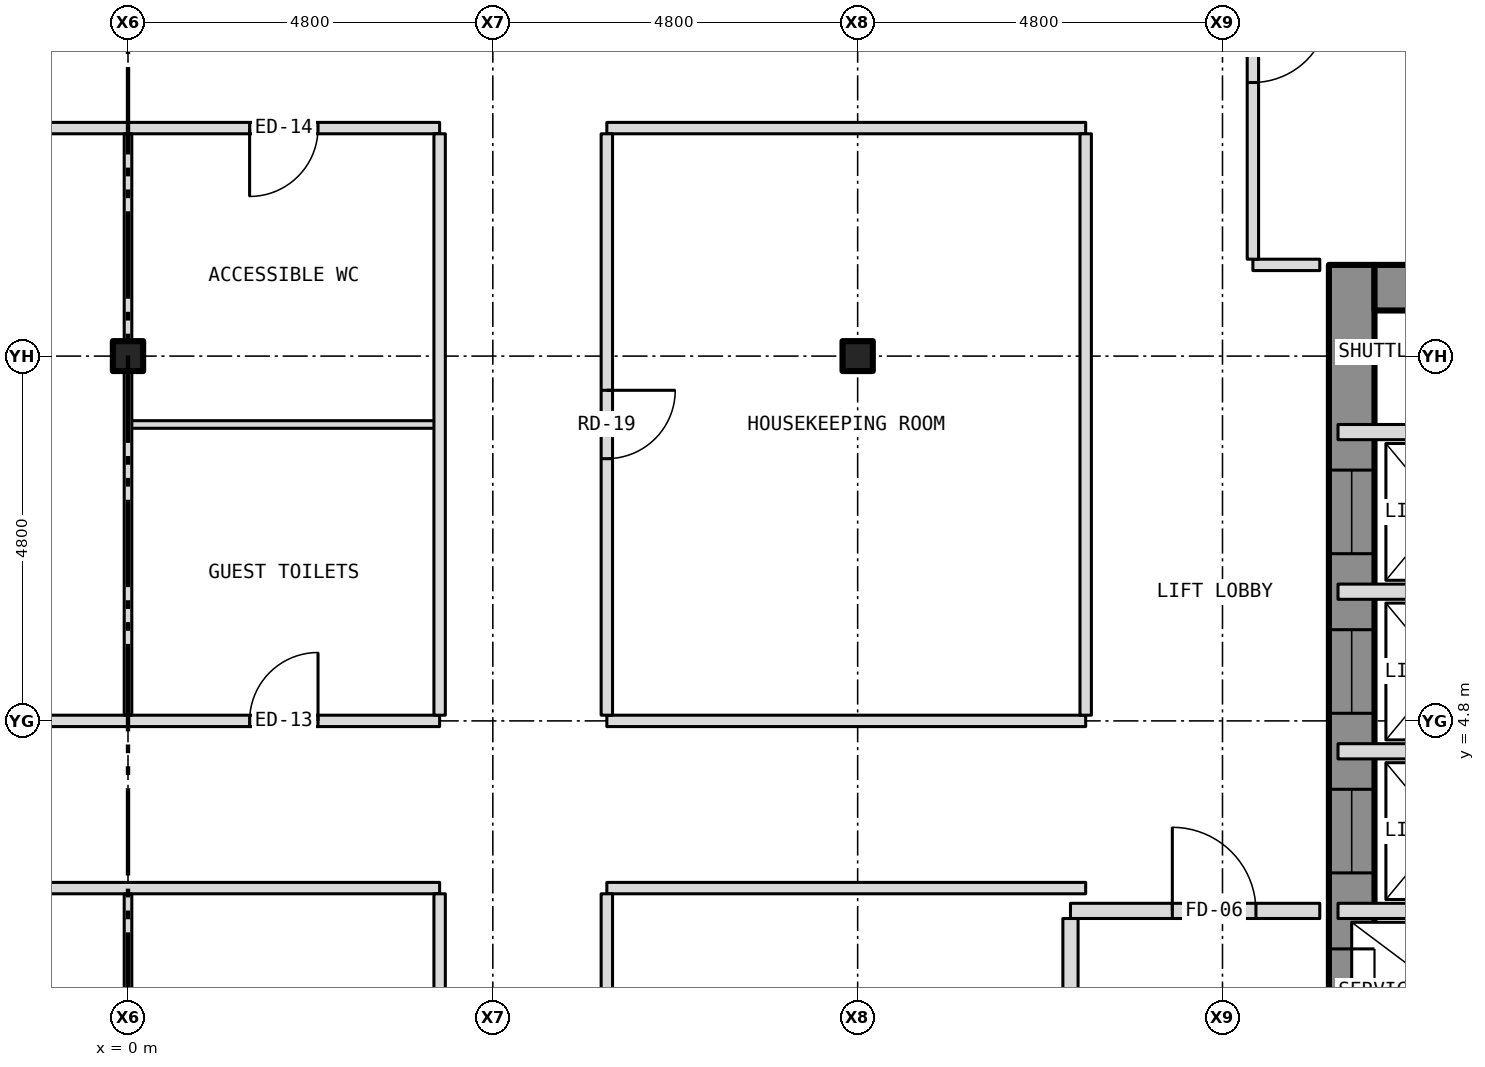
"""IFC4 building model, lengths in metres.
Left out: names, types, materials, properties, quantities, classifications, styles, units other than length and angle.
Written with IfcOpenShell. Run it as: python <this file> out.ifc"""

import sys

from ifc_helpers import new_model, si_unit, direction, frame, frame_2d, origin, origin_2d, place, context, subcontext, project, spatial, rectangle, i_section, extrude, element, fill, save


model = new_model("IFC4")
c1 = context("Model", 3, precision=1e-05, world=origin(), true_north=direction((0.0, 1.0)))
c2 = subcontext(c1, "Body", "Model", "MODEL_VIEW")
j1 = project(units=[si_unit("LENGTHUNIT", "METRE"), si_unit("PLANEANGLEUNIT", "RADIAN")], contexts=[c1])
p1 = place(None, origin())
s1 = spatial("IfcSite", under=j1, at=p1, CompositionType="ELEMENT")
p2 = place(p1, origin())
s2 = spatial("IfcBuilding", under=s1, at=p2, CompositionType="ELEMENT")
p3 = place(p2, frame((0.0, 0.0, 106.5)))
s3 = spatial("IfcBuildingStorey", under=s2, at=p3, CompositionType="ELEMENT", Elevation=106.5)
for number, where, z_axis, x_axis in (
    (1, (0.0, 9.6, -0.15), (0.0, 0.0, 1.0), (1.0, 0.0, 0.0)),
    (2, (9.6, 9.6, -0.15), (0.0, 0.0, 1.0), (1.0, 0.0, 0.0)),
):
    element("IfcColumn", number, at=place(p3, frame(where, z_axis=z_axis, x_axis=x_axis)), inside=s3, PredefinedType="COLUMN", context=c2, shape_type="SweptSolid", body=[
        extrude(i_section(OverallWidth=0.399, OverallDepth=0.394, WebThickness=0.023, FlangeThickness=0.037, at=origin_2d()), origin(), (0.0, 0.0, 1.0), 3.5),
    ])
p4 = place(p3, frame((16.1, -10.8, 0.0), z_axis=(0.0, 0.0, 1.0), x_axis=(0.0, 1.0, 0.0)))
e3 = element("IfcWall", 3, at=p4, inside=s3, PredefinedType="SHEAR", context=c2, shape_type="SweptSolid", body=[
    extrude(rectangle(XDim=21.6, YDim=0.6, at=frame_2d((10.8, 0.0))), origin(), (0.0, 0.0, 1.0), 3.25),
])
p5 = place(p4, frame((9.4, 0.0, 0.0)))
e4 = element("IfcOpeningElement", 4, at=p5, cuts=e3, PredefinedType="OPENING", context=c2, shape_type="SweptSolid", body=[
    extrude(rectangle(XDim=1.1, YDim=2.1, at=frame_2d((0.55, 1.05))), frame((0.0, 0.312, 0.0), z_axis=(0.0, -1.0, 0.0), x_axis=(1.0, 0.0, 0.0)), (0.0, 0.0, 1.0), 0.624),
])
p6 = place(p4, frame((11.5, 0.0, 0.0)))
e5 = element("IfcOpeningElement", 5, at=p6, cuts=e3, PredefinedType="OPENING", context=c2, shape_type="SweptSolid", body=[
    extrude(rectangle(XDim=1.1, YDim=2.1, at=frame_2d((0.55, 1.05))), frame((0.0, 0.312, 0.0), z_axis=(0.0, -1.0, 0.0), x_axis=(1.0, 0.0, 0.0)), (0.0, 0.0, 1.0), 0.624),
])
p7 = place(p4, frame((13.6, 0.0, 0.0)))
e6 = element("IfcOpeningElement", 6, at=p7, cuts=e3, PredefinedType="OPENING", context=c2, shape_type="SweptSolid", body=[
    extrude(rectangle(XDim=1.1, YDim=2.1, at=frame_2d((0.55, 1.05))), frame((0.0, 0.312, 0.0), z_axis=(0.0, -1.0, 0.0), x_axis=(1.0, 0.0, 0.0)), (0.0, 0.0, 1.0), 0.624),
])
p8 = place(p4, frame((15.7, 0.0, 0.0)))
e7 = element("IfcOpeningElement", 7, at=p8, cuts=e3, PredefinedType="OPENING", context=c2, shape_type="SweptSolid", body=[
    extrude(rectangle(XDim=1.1, YDim=2.1, at=frame_2d((0.55, 1.05))), frame((0.0, 0.312, 0.0), z_axis=(0.0, -1.0, 0.0), x_axis=(1.0, 0.0, 0.0)), (0.0, 0.0, 1.0), 0.624),
])
p9 = place(p4, frame((17.8, 0.0, 0.0)))
e8 = element("IfcOpeningElement", 8, at=p9, cuts=e3, PredefinedType="OPENING", context=c2, shape_type="SweptSolid", body=[
    extrude(rectangle(XDim=1.1, YDim=2.1, at=frame_2d((0.55, 1.05))), frame((0.0, 0.312, 0.0), z_axis=(0.0, -1.0, 0.0), x_axis=(1.0, 0.0, 0.0)), (0.0, 0.0, 1.0), 0.624),
])
p10 = place(p4, frame((5.642, 0.0, 0.0)))
e9 = element("IfcOpeningElement", 9, at=p10, cuts=e3, PredefinedType="OPENING", context=c2, shape_type="SweptSolid", body=[
    extrude(rectangle(XDim=1.1, YDim=2.1, at=frame_2d((0.55, 1.05))), frame((0.0, 0.312, 0.0), z_axis=(0.0, -1.0, 0.0), x_axis=(1.0, 0.0, 0.0)), (0.0, 0.0, 1.0), 0.624),
])
p11 = place(p4, frame((7.5, 0.0, 0.0)))
e10 = element("IfcOpeningElement", 10, at=p11, cuts=e3, PredefinedType="OPENING", context=c2, shape_type="SweptSolid", body=[
    extrude(rectangle(XDim=1.1, YDim=2.1, at=frame_2d((0.55, 1.05))), frame((0.0, 0.312, 0.0), z_axis=(0.0, -1.0, 0.0), x_axis=(1.0, 0.0, 0.0)), (0.0, 0.0, 1.0), 0.624),
])
p12 = place(p3, frame((16.4, 10.5, 0.0), z_axis=(0.0, 0.0, 1.0), x_axis=(1.0, 0.0, 0.0)))
e11 = element("IfcWall", 11, at=p12, inside=s3, PredefinedType="SHEAR", context=c2, shape_type="SweptSolid", body=[
    extrude(rectangle(XDim=5.8, YDim=0.6, at=frame_2d((2.9, 0.0))), origin(), (0.0, 0.0, 1.0), 3.25),
])
p13 = place(p3, frame((12.4, 2.3, 0.0), z_axis=(0.0, 0.0, 1.0), x_axis=(1.0, 0.0, 0.0)))
e12 = element("IfcWall", 12, at=p13, inside=s3, PredefinedType="PARTITIONING", context=c2, shape_type="SweptSolid", body=[
    extrude(rectangle(XDim=3.28, YDim=0.2, at=frame_2d((1.64, 0.0))), origin(), (0.0, 0.0, 1.0), 3.35),
])
p14 = place(p13, frame((1.34, 0.0, 0.0)))
e13 = element("IfcOpeningElement", 13, at=p14, cuts=e12, PredefinedType="OPENING", context=c2, shape_type="SweptSolid", body=[
    extrude(rectangle(XDim=1.1, YDim=2.1, at=frame_2d((0.55, 1.05))), frame((0.0, 0.112, 0.0), z_axis=(0.0, -1.0, 0.0), x_axis=(1.0, 0.0, 0.0)), (0.0, 0.0, 1.0), 0.224),
])
p15 = place(p3, frame((15.92, 2.3, 0.0), z_axis=(0.0, 0.0, 1.0), x_axis=(1.0, 0.0, 0.0)))
e14 = element("IfcWall", 14, at=p15, inside=s3, PredefinedType="PARTITIONING", context=c2, shape_type="SweptSolid", body=[
    extrude(rectangle(XDim=2.88, YDim=0.2, at=frame_2d((1.44, 0.0))), origin(), (0.0, 0.0, 1.0), 3.25),
])
p16 = place(p3, frame((-12.6, 2.6, 0.0), z_axis=(0.0, 0.0, 1.0), x_axis=(1.0, 0.0, 0.0)))
e15 = element("IfcWall", 15, at=p16, inside=s3, PredefinedType="PARTITIONING", context=c2, shape_type="SweptSolid", body=[
    extrude(rectangle(XDim=16.7, YDim=0.15, at=frame_2d((8.35, 0.0))), origin(), (0.0, 0.0, 1.0), 3.35),
])
p17 = place(p16, frame((5.85, 0.0, 0.0)))
e16 = element("IfcOpeningElement", 16, at=p17, cuts=e15, PredefinedType="OPENING", context=c2, shape_type="SweptSolid", body=[
    extrude(rectangle(XDim=0.9, YDim=2.1, at=frame_2d((0.45, 1.05))), frame((0.0, 0.087, 0.0), z_axis=(0.0, -1.0, 0.0), x_axis=(1.0, 0.0, 0.0)), (0.0, 0.0, 1.0), 0.174),
])
p18 = place(p3, frame((6.3, 2.6, 0.0), z_axis=(0.0, 0.0, 1.0), x_axis=(1.0, 0.0, 0.0)))
e17 = element("IfcWall", 17, at=p18, inside=s3, PredefinedType="PARTITIONING", context=c2, shape_type="SweptSolid", body=[
    extrude(rectangle(XDim=6.3, YDim=0.15, at=frame_2d((3.15, 0.0))), origin(), (0.0, 0.0, 1.0), 3.35),
])
p19 = place(p3, frame((15.92, 4.4, 0.0), z_axis=(0.0, 0.0, 1.0), x_axis=(1.0, 0.0, 0.0)))
e18 = element("IfcWall", 18, at=p19, inside=s3, PredefinedType="PARTITIONING", context=c2, shape_type="SweptSolid", body=[
    extrude(rectangle(XDim=2.88, YDim=0.2, at=frame_2d((1.44, 0.0))), origin(), (0.0, 0.0, 1.0), 3.25),
])
p20 = place(p3, frame((-12.6, 4.8, 0.0), z_axis=(0.0, 0.0, 1.0), x_axis=(1.0, 0.0, 0.0)))
e19 = element("IfcWall", 19, at=p20, inside=s3, PredefinedType="PARTITIONING", context=c2, shape_type="SweptSolid", body=[
    extrude(rectangle(XDim=16.7, YDim=0.15, at=frame_2d((8.35, 0.0))), origin(), (0.0, 0.0, 1.0), 3.35),
])
p21 = place(p20, frame((14.2, 0.0, 0.0)))
e20 = element("IfcOpeningElement", 20, at=p21, cuts=e19, PredefinedType="OPENING", context=c2, shape_type="SweptSolid", body=[
    extrude(rectangle(XDim=0.9, YDim=2.1, at=frame_2d((0.45, 1.05))), frame((0.0, 0.087, 0.0), z_axis=(0.0, -1.0, 0.0), x_axis=(1.0, 0.0, 0.0)), (0.0, 0.0, 1.0), 0.174),
])
p22 = place(p3, frame((6.3, 4.8, 0.0), z_axis=(0.0, 0.0, 1.0), x_axis=(1.0, 0.0, 0.0)))
e21 = element("IfcWall", 21, at=p22, inside=s3, PredefinedType="PARTITIONING", context=c2, shape_type="SweptSolid", body=[
    extrude(rectangle(XDim=6.3, YDim=0.15, at=frame_2d((3.15, 0.0))), origin(), (0.0, 0.0, 1.0), 3.35),
])
for number, where, z_axis, x_axis in (
    (22, (15.92, 6.5, 0.0), (0.0, 0.0, 1.0), (1.0, 0.0, 0.0)),
    (23, (15.92, 8.6, 0.0), (0.0, 0.0, 1.0), (1.0, 0.0, 0.0)),
):
    element("IfcWall", number, at=place(p3, frame(where, z_axis=z_axis, x_axis=x_axis)), inside=s3, PredefinedType="PARTITIONING", context=c2, shape_type="SweptSolid", body=[
        extrude(rectangle(XDim=2.88, YDim=0.2, at=frame_2d((1.44, 0.0))), origin(), (0.0, 0.0, 1.0), 3.25),
    ])
p23 = place(p3, frame((0.0, 8.7, 0.0), z_axis=(0.0, 0.0, 1.0), x_axis=(1.0, 0.0, 0.0)))
e24 = element("IfcWall", 24, at=p23, inside=s3, PredefinedType="PARTITIONING", context=c2, shape_type="SweptSolid", body=[
    extrude(rectangle(XDim=4.1, YDim=0.1, at=frame_2d((2.05, 0.0))), origin(), (0.0, 0.0, 1.0), 3.35),
])
p24 = place(p3, frame((14.8, 10.8, 0.0), z_axis=(0.0, 0.0, 1.0), x_axis=(1.0, 0.0, 0.0)))
e25 = element("IfcWall", 25, at=p24, inside=s3, PredefinedType="PARTITIONING", context=c2, shape_type="SweptSolid", body=[
    extrude(rectangle(XDim=0.88, YDim=0.15, at=frame_2d((0.44, 0.0))), origin(), (0.0, 0.0, 1.0), 3.35),
])
p25 = place(p3, frame((-12.6, 12.6, 0.0), z_axis=(0.0, 0.0, 1.0), x_axis=(1.0, 0.0, 0.0)))
e26 = element("IfcWall", 26, at=p25, inside=s3, PredefinedType="PARTITIONING", context=c2, shape_type="SweptSolid", body=[
    extrude(rectangle(XDim=16.7, YDim=0.15, at=frame_2d((8.35, 0.0))), origin(), (0.0, 0.0, 1.0), 3.35),
])
p26 = place(p25, frame((14.2, 0.0, 0.0)))
e27 = element("IfcOpeningElement", 27, at=p26, cuts=e26, PredefinedType="OPENING", context=c2, shape_type="SweptSolid", body=[
    extrude(rectangle(XDim=0.9, YDim=2.1, at=frame_2d((0.45, 1.05))), frame((0.0, 0.087, 0.0), z_axis=(0.0, -1.0, 0.0), x_axis=(1.0, 0.0, 0.0)), (0.0, 0.0, 1.0), 0.174),
])
p27 = place(p25, frame((5.85, 0.0, 0.0)))
e28 = element("IfcOpeningElement", 28, at=p27, cuts=e26, PredefinedType="OPENING", context=c2, shape_type="SweptSolid", body=[
    extrude(rectangle(XDim=0.9, YDim=2.1, at=frame_2d((0.45, 1.05))), frame((0.0, 0.087, 0.0), z_axis=(0.0, -1.0, 0.0), x_axis=(1.0, 0.0, 0.0)), (0.0, 0.0, 1.0), 0.174),
])
p28 = place(p3, frame((6.3, 12.6, 0.0), z_axis=(0.0, 0.0, 1.0), x_axis=(1.0, 0.0, 0.0)))
e29 = element("IfcWall", 29, at=p28, inside=s3, PredefinedType="PARTITIONING", context=c2, shape_type="SweptSolid", body=[
    extrude(rectangle(XDim=6.3, YDim=0.15, at=frame_2d((3.15, 0.0))), origin(), (0.0, 0.0, 1.0), 3.35),
])
p29 = place(p3, frame((0.0, 0.199, 0.0), z_axis=(0.0, 0.0, 1.0), x_axis=(0.0, 1.0, 0.0)))
e30 = element("IfcWall", 30, at=p29, inside=s3, PredefinedType="PARTITIONING", context=c2, shape_type="SweptSolid", body=[
    extrude(rectangle(XDim=2.326, YDim=0.1, at=frame_2d((1.163, 0.0))), origin(), (0.0, 0.0, 1.0), 2.728),
])
p30 = place(p3, frame((0.0, 4.875, 0.0), z_axis=(0.0, 0.0, 1.0), x_axis=(0.0, 1.0, 0.0)))
e31 = element("IfcWall", 31, at=p30, inside=s3, PredefinedType="PARTITIONING", context=c2, shape_type="SweptSolid", body=[
    extrude(rectangle(XDim=4.526, YDim=0.1, at=frame_2d((2.263, 0.0))), origin(), (0.0, 0.0, 1.0), 2.728),
])
p31 = place(p3, frame((0.0, 9.401, 0.0), z_axis=(0.0, 0.0, 1.0), x_axis=(0.0, 1.0, 0.0)))
e32 = element("IfcWall", 32, at=p31, inside=s3, PredefinedType="PARTITIONING", context=c2, shape_type="SweptSolid", body=[
    extrude(rectangle(XDim=0.398, YDim=0.1, at=frame_2d((0.199, 0.0))), origin(), (0.0, 0.0, 1.0), 3.35),
])
p32 = place(p3, frame((0.0, 9.799, 0.0), z_axis=(0.0, 0.0, 1.0), x_axis=(0.0, 1.0, 0.0)))
e33 = element("IfcWall", 33, at=p32, inside=s3, PredefinedType="PARTITIONING", context=c2, shape_type="SweptSolid", body=[
    extrude(rectangle(XDim=2.726, YDim=0.1, at=frame_2d((1.363, 0.0))), origin(), (0.0, 0.0, 1.0), 2.728),
])
p33 = place(p3, frame((4.1, -12.525, 0.0), z_axis=(0.0, 0.0, 1.0), x_axis=(0.0, 1.0, 0.0)))
e34 = element("IfcWall", 34, at=p33, inside=s3, PredefinedType="PARTITIONING", context=c2, shape_type="SweptSolid", body=[
    extrude(rectangle(XDim=15.05, YDim=0.15, at=frame_2d((7.525, 0.0))), origin(), (0.0, 0.0, 1.0), 3.35),
])
p34 = place(p33, frame((7.075, 0.0, 0.0)))
e35 = element("IfcOpeningElement", 35, at=p34, cuts=e34, PredefinedType="OPENING", context=c2, shape_type="SweptSolid", body=[
    extrude(rectangle(XDim=0.9, YDim=2.1, at=frame_2d((0.45, 1.05))), frame((0.0, 0.087, 0.0), z_axis=(0.0, -1.0, 0.0), x_axis=(1.0, 0.0, 0.0)), (0.0, 0.0, 1.0), 0.174),
])
p35 = place(p3, frame((4.1, 4.875, 0.0), z_axis=(0.0, 0.0, 1.0), x_axis=(0.0, 1.0, 0.0)))
e36 = element("IfcWall", 36, at=p35, inside=s3, PredefinedType="PARTITIONING", context=c2, shape_type="SweptSolid", body=[
    extrude(rectangle(XDim=7.65, YDim=0.15, at=frame_2d((3.825, 0.0))), origin(), (0.0, 0.0, 1.0), 3.35),
])
p36 = place(p3, frame((6.3, -12.525, 0.0), z_axis=(0.0, 0.0, 1.0), x_axis=(0.0, 1.0, 0.0)))
e37 = element("IfcWall", 37, at=p36, inside=s3, PredefinedType="PARTITIONING", context=c2, shape_type="SweptSolid", body=[
    extrude(rectangle(XDim=15.05, YDim=0.15, at=frame_2d((7.525, 0.0))), origin(), (0.0, 0.0, 1.0), 3.35),
])
p37 = place(p36, frame((7.075, 0.0, 0.0)))
e38 = element("IfcOpeningElement", 38, at=p37, cuts=e37, PredefinedType="OPENING", context=c2, shape_type="SweptSolid", body=[
    extrude(rectangle(XDim=0.9, YDim=2.1, at=frame_2d((0.45, 1.05))), frame((0.0, 0.087, 0.0), z_axis=(0.0, -1.0, 0.0), x_axis=(1.0, 0.0, 0.0)), (0.0, 0.0, 1.0), 0.174),
])
p38 = place(p3, frame((6.3, 4.875, 0.0), z_axis=(0.0, 0.0, 1.0), x_axis=(0.0, 1.0, 0.0)))
e39 = element("IfcWall", 39, at=p38, inside=s3, PredefinedType="PARTITIONING", context=c2, shape_type="SweptSolid", body=[
    extrude(rectangle(XDim=7.65, YDim=0.15, at=frame_2d((3.825, 0.0))), origin(), (0.0, 0.0, 1.0), 3.35),
])
p39 = place(p38, frame((3.375, 0.0, 0.0)))
e40 = element("IfcOpeningElement", 40, at=p39, cuts=e39, PredefinedType="OPENING", context=c2, shape_type="SweptSolid", body=[
    extrude(rectangle(XDim=0.9, YDim=2.1, at=frame_2d((0.45, 1.05))), frame((0.0, 0.087, 0.0), z_axis=(0.0, -1.0, 0.0), x_axis=(1.0, 0.0, 0.0)), (0.0, 0.0, 1.0), 0.174),
])
p40 = place(p3, frame((12.4, -1.8, 0.0), z_axis=(0.0, 0.0, 1.0), x_axis=(0.0, 1.0, 0.0)))
e41 = element("IfcWall", 41, at=p40, inside=s3, PredefinedType="PARTITIONING", context=c2, shape_type="SweptSolid", body=[
    extrude(rectangle(XDim=4.0, YDim=0.2, at=frame_2d((2.0, 0.0))), origin(), (0.0, 0.0, 1.0), 3.35),
])
p41 = place(p3, frame((12.6, 4.875, 0.0), z_axis=(0.0, 0.0, 1.0), x_axis=(0.0, 1.0, 0.0)))
e42 = element("IfcWall", 42, at=p41, inside=s3, PredefinedType="PARTITIONING", context=c2, shape_type="SweptSolid", body=[
    extrude(rectangle(XDim=7.65, YDim=0.15, at=frame_2d((3.825, 0.0))), origin(), (0.0, 0.0, 1.0), 3.35),
])
p42 = place(p3, frame((14.8, 10.875, 0.0), z_axis=(0.0, 0.0, 1.0), x_axis=(0.0, 1.0, 0.0)))
e43 = element("IfcWall", 43, at=p42, inside=s3, PredefinedType="PARTITIONING", context=c2, shape_type="SweptSolid", body=[
    extrude(rectangle(XDim=3.85, YDim=0.15, at=frame_2d((1.925, 0.0))), origin(), (0.0, 0.0, 1.0), 3.35),
])
p43 = place(p42, frame((2.325, 0.0, 0.0)))
e44 = element("IfcOpeningElement", 44, at=p43, cuts=e43, PredefinedType="OPENING", context=c2, shape_type="SweptSolid", body=[
    extrude(rectangle(XDim=1.0, YDim=2.1, at=frame_2d((0.5, 1.05))), frame((0.0, 0.087, 0.0), z_axis=(0.0, -1.0, 0.0), x_axis=(1.0, 0.0, 0.0)), (0.0, 0.0, 1.0), 0.174),
])
p44 = place(p6, origin())
e45 = element("IfcDoor", 45, at=p44, inside=s3, OperationType="SLIDING_TO_LEFT", PredefinedType="DOOR", context=c2, shape_type="SweptSolid", body=[
    extrude(rectangle(XDim=1.1, YDim=2.1, at=frame_2d((0.55, 1.05))), frame((0.0, 0.025, 0.0), z_axis=(0.0, -1.0, 0.0), x_axis=(1.0, 0.0, 0.0)), (0.0, 0.0, 1.0), 0.05),
])
fill(e5, e45)
p45 = place(p7, origin())
e46 = element("IfcDoor", 46, at=p45, inside=s3, OperationType="SLIDING_TO_LEFT", PredefinedType="DOOR", context=c2, shape_type="SweptSolid", body=[
    extrude(rectangle(XDim=1.1, YDim=2.1, at=frame_2d((0.55, 1.05))), frame((0.0, 0.025, 0.0), z_axis=(0.0, -1.0, 0.0), x_axis=(1.0, 0.0, 0.0)), (0.0, 0.0, 1.0), 0.05),
])
fill(e6, e46)
p46 = place(p8, origin())
e47 = element("IfcDoor", 47, at=p46, inside=s3, OperationType="SLIDING_TO_LEFT", PredefinedType="DOOR", context=c2, shape_type="SweptSolid", body=[
    extrude(rectangle(XDim=1.1, YDim=2.1, at=frame_2d((0.55, 1.05))), frame((0.0, 0.025, 0.0), z_axis=(0.0, -1.0, 0.0), x_axis=(1.0, 0.0, 0.0)), (0.0, 0.0, 1.0), 0.05),
])
fill(e7, e47)
p47 = place(p9, origin())
e48 = element("IfcDoor", 48, at=p47, inside=s3, OperationType="SLIDING_TO_LEFT", PredefinedType="DOOR", context=c2, shape_type="SweptSolid", body=[
    extrude(rectangle(XDim=1.1, YDim=2.1, at=frame_2d((0.55, 1.05))), frame((0.0, 0.025, 0.0), z_axis=(0.0, -1.0, 0.0), x_axis=(1.0, 0.0, 0.0)), (0.0, 0.0, 1.0), 0.05),
])
fill(e8, e48)
p48 = place(p14, origin())
e49 = element("IfcDoor", 49, at=p48, inside=s3, OperationType="SINGLE_SWING_LEFT", PredefinedType="DOOR", context=c2, shape_type="SweptSolid", body=[
    extrude(rectangle(XDim=1.1, YDim=2.1, at=frame_2d((0.55, 1.05))), frame((0.0, 0.025, 0.0), z_axis=(0.0, -1.0, 0.0), x_axis=(1.0, 0.0, 0.0)), (0.0, 0.0, 1.0), 0.05),
])
fill(e13, e49)
p49 = place(p43, origin())
e50 = element("IfcDoor", 50, at=p49, inside=s3, OperationType="SINGLE_SWING_RIGHT", PredefinedType="DOOR", context=c2, shape_type="SweptSolid", body=[
    extrude(rectangle(XDim=1.0, YDim=2.1, at=frame_2d((0.5, 1.05))), frame((0.0, 0.025, 0.0), z_axis=(0.0, -1.0, 0.0), x_axis=(1.0, 0.0, 0.0)), (0.0, 0.0, 1.0), 0.05),
])
fill(e44, e50)
p50 = place(p21, origin())
e51 = element("IfcDoor", 51, at=p50, inside=s3, OperationType="SINGLE_SWING_RIGHT", PredefinedType="DOOR", context=c2, shape_type="SweptSolid", body=[
    extrude(rectangle(XDim=0.9, YDim=2.1, at=frame_2d((0.45, 1.05))), frame((0.0, 0.025, 0.0), z_axis=(0.0, -1.0, 0.0), x_axis=(1.0, 0.0, 0.0)), (0.0, 0.0, 1.0), 0.05),
])
fill(e20, e51)
p51 = place(p26, origin())
e52 = element("IfcDoor", 52, at=p51, inside=s3, OperationType="SINGLE_SWING_LEFT", PredefinedType="DOOR", context=c2, shape_type="SweptSolid", body=[
    extrude(rectangle(XDim=0.9, YDim=2.1, at=frame_2d((0.45, 1.05))), frame((0.0, 0.025, 0.0), z_axis=(0.0, -1.0, 0.0), x_axis=(1.0, 0.0, 0.0)), (0.0, 0.0, 1.0), 0.05),
])
fill(e27, e52)
p52 = place(p39, origin())
e53 = element("IfcDoor", 53, at=p52, inside=s3, OperationType="SINGLE_SWING_RIGHT", PredefinedType="DOOR", context=c2, shape_type="SweptSolid", body=[
    extrude(rectangle(XDim=0.9, YDim=2.1, at=frame_2d((0.45, 1.05))), frame((0.0, 0.025, 0.0), z_axis=(0.0, -1.0, 0.0), x_axis=(1.0, 0.0, 0.0)), (0.0, 0.0, 1.0), 0.05),
])
fill(e40, e53)
save(model, sys.argv[1])
